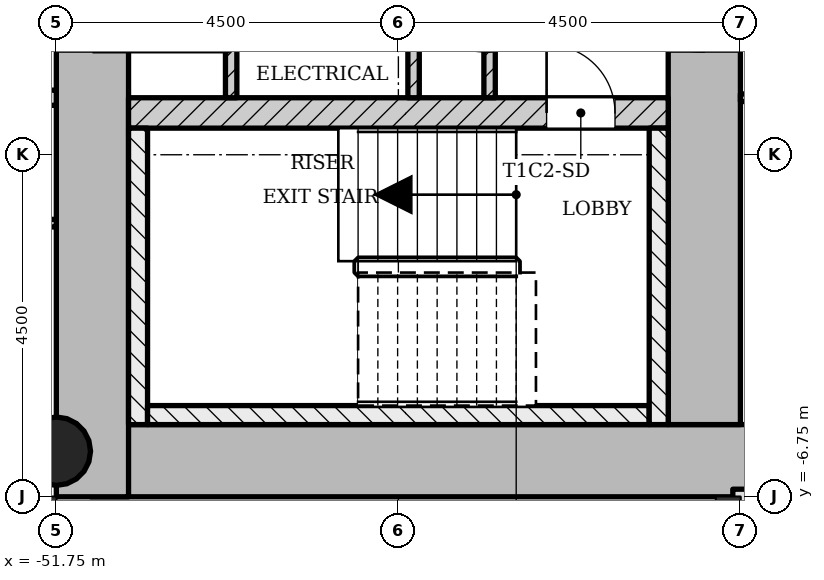
"""IFC4 building model, lengths in metres.
Left out: names, types, materials, properties, quantities, classifications, styles, units other than length and angle.
Written with IfcOpenShell. Run it as: python <this file> out.ifc"""

import sys

from ifc_helpers import new_model, si_unit, direction, frame, frame_2d, origin, origin_2d, place, context, subcontext, project, spatial, rectangle, hollow_circle, extrude, element, fill, save


model = new_model("IFC4")
c1 = context("Model", 3, precision=1e-05, world=origin(), true_north=direction((0.0, 1.0)))
c2 = subcontext(c1, "Body", "Model", "MODEL_VIEW")
j1 = project(units=[si_unit("LENGTHUNIT", "METRE"), si_unit("PLANEANGLEUNIT", "RADIAN")], contexts=[c1])
p1 = place(None, origin())
s1 = spatial("IfcSite", under=j1, at=p1, CompositionType="ELEMENT")
p2 = place(p1, origin())
s2 = spatial("IfcBuilding", under=s1, at=p2, CompositionType="ELEMENT")
p3 = place(p2, frame((0.0, 0.0, 76.6)))
s3 = spatial("IfcBuildingStorey", under=s2, at=p3, CompositionType="ELEMENT", Elevation=76.6)
p4 = place(p3, frame((-51.298, -6.275, 0.0), z_axis=(0.0, 0.0, 1.0), x_axis=(1.0, 0.0, 0.0)))
e1 = element("IfcWall", 1, at=p4, inside=s3, PredefinedType="SHEAR", context=c2, shape_type="SweptSolid", body=[
    extrude(rectangle(XDim=8.696, YDim=0.95, at=frame_2d((4.348, 0.0))), origin(), (0.0, 0.0, 1.0), 3.4),
])
p5 = place(p3, frame((-43.225, -5.8, 0.0), z_axis=(0.0, 0.0, 1.0), x_axis=(0.0, 1.0, 0.0)))
e2 = element("IfcWall", 2, at=p5, inside=s3, PredefinedType="SHEAR", context=c2, shape_type="SweptSolid", body=[
    extrude(rectangle(XDim=12.55, YDim=0.95, at=frame_2d((6.275, 0.0))), origin(), (0.0, 0.0, 1.0), 3.4),
])
p6 = place(p5, frame((4.9, 0.0, 0.0)))
e3 = element("IfcOpeningElement", 3, at=p6, cuts=e2, PredefinedType="OPENING", context=c2, shape_type="SweptSolid", body=[
    extrude(rectangle(XDim=1.8, YDim=2.1, at=frame_2d((0.9, 1.05))), frame((0.0, 0.485, 0.0), z_axis=(0.0, -1.0, 0.0), x_axis=(1.0, 0.0, 0.0)), (0.0, 0.0, 1.0), 0.97),
])
p7 = place(p3, frame((-51.275, 5.8, 0.0), z_axis=(0.0, 0.0, 1.0), x_axis=(0.0, -1.0, 0.0)))
e4 = element("IfcWall", 4, at=p7, inside=s3, PredefinedType="SHEAR", context=c2, shape_type="SweptSolid", body=[
    extrude(rectangle(XDim=12.55, YDim=0.95, at=frame_2d((6.275, 0.0))), origin(), (0.0, 0.0, 1.0), 3.4),
])
p8 = place(p7, frame((4.9, 0.0, 0.0)))
e5 = element("IfcOpeningElement", 5, at=p8, cuts=e4, PredefinedType="OPENING", context=c2, shape_type="SweptSolid", body=[
    extrude(rectangle(XDim=1.8, YDim=2.1, at=frame_2d((0.9, 1.05))), frame((0.0, 0.485, 0.0), z_axis=(0.0, -1.0, 0.0), x_axis=(1.0, 0.0, 0.0)), (0.0, 0.0, 1.0), 0.97),
])
p9 = place(p3, frame((-50.8, -1.7, 0.0), z_axis=(0.0, 0.0, 1.0), x_axis=(1.0, 0.0, 0.0)))
e6 = element("IfcWall", 6, at=p9, inside=s3, PredefinedType="SHEAR", context=c2, shape_type="SweptSolid", body=[
    extrude(rectangle(XDim=7.1, YDim=0.4, at=frame_2d((3.55, 0.0))), origin(), (0.0, 0.0, 1.0), 3.4),
])
p10 = place(p9, frame((5.5, 0.0, 0.0)))
e7 = element("IfcOpeningElement", 7, at=p10, cuts=e6, PredefinedType="OPENING", context=c2, shape_type="SweptSolid", body=[
    extrude(rectangle(XDim=0.9, YDim=2.1, at=frame_2d((0.45, 1.05))), frame((0.0, 0.21, 0.0), z_axis=(0.0, -1.0, 0.0), x_axis=(1.0, 0.0, 0.0)), (0.0, 0.0, 1.0), 0.42),
])
p11 = place(p3, frame((-51.75, -6.15, 0.0), z_axis=(0.0, 0.0, 1.0), x_axis=(1.0, 0.0, 0.0)))
e8 = element("IfcColumn", 8, at=p11, inside=s3, PredefinedType="COLUMN", context=c2, shape_type="SweptSolid", body=[
    extrude(hollow_circle(Radius=0.45, WallThickness=0.032, at=origin_2d()), origin(), (0.0, 0.0, 1.0), 3.4),
])
p12 = place(p3, frame((-46.05, 1.5, 0.0), z_axis=(0.0, 0.0, 1.0), x_axis=(0.0, -1.0, 0.0)))
e9 = element("IfcWall", 9, at=p12, inside=s3, PredefinedType="PARTITIONING", context=c2, shape_type="SweptSolid", body=[
    extrude(rectangle(XDim=3.0, YDim=0.15, at=frame_2d((1.5, 0.0))), origin(), (0.0, 0.0, 1.0), 3.0),
])
p13 = place(p12, frame((0.6, 0.0, 0.0)))
e10 = element("IfcOpeningElement", 10, at=p13, cuts=e9, PredefinedType="OPENING", context=c2, shape_type="SweptSolid", body=[
    extrude(rectangle(XDim=1.8, YDim=2.1, at=frame_2d((0.9, 1.05))), frame((0.0, 0.085, 0.0), z_axis=(0.0, -1.0, 0.0), x_axis=(1.0, 0.0, 0.0)), (0.0, 0.0, 1.0), 0.17),
])
for number, where, z_axis, x_axis in (
    (11, (-47.05, -0.3, 0.0), (0.0, 0.0, 1.0), (0.0, -1.0, 0.0)),
    (12, (-49.45, -0.3, 0.0), (0.0, 0.0, 1.0), (0.0, -1.0, 0.0)),
):
    element("IfcWall", number, at=place(p3, frame(where, z_axis=z_axis, x_axis=x_axis)), inside=s3, PredefinedType="PARTITIONING", context=c2, shape_type="SweptSolid", body=[
        extrude(rectangle(XDim=1.2, YDim=0.15, at=frame_2d((0.6, 0.0))), origin(), (0.0, 0.0, 1.0), 3.0),
    ])
p14 = place(p3, frame((-42.85, -6.75, 0.0), z_axis=(0.0, 0.0, 1.0), x_axis=(1.0, 0.0, 0.0)))
e13 = element("IfcWall", 13, at=p14, inside=s3, PredefinedType="SOLIDWALL", context=c2, shape_type="SweptSolid", body=[
    extrude(rectangle(XDim=5.95, YDim=0.2, at=frame_2d((2.975, 0.0))), origin(), (0.0, 0.0, 1.0), 3.0),
])
p15 = place(p3, frame((-56.25, -3.15, 0.0), z_axis=(0.0, 0.0, 1.0), x_axis=(1.0, 0.0, 0.0)))
e14 = element("IfcWall", 14, at=p15, inside=s3, PredefinedType="PARTITIONING", context=c2, shape_type="SweptSolid", body=[
    extrude(rectangle(XDim=4.5, YDim=0.1, at=frame_2d((2.25, 0.0))), origin(), (0.0, 0.0, 1.0), 3.0),
])
p16 = place(p15, frame((0.6, 0.0, 0.0)))
e15 = element("IfcOpeningElement", 15, at=p16, cuts=e14, PredefinedType="OPENING", context=c2, shape_type="SweptSolid", body=[
    extrude(rectangle(XDim=0.9, YDim=2.1, at=frame_2d((0.45, 1.05))), frame((0.0, 0.06, 0.0), z_axis=(0.0, -1.0, 0.0), x_axis=(1.0, 0.0, 0.0)), (0.0, 0.0, 1.0), 0.12),
])
p17 = place(p3, frame((-42.75, -1.5, 0.0), z_axis=(0.0, 0.0, 1.0), x_axis=(1.0, 0.0, 0.0)))
e16 = element("IfcWall", 16, at=p17, inside=s3, PredefinedType="PARTITIONING", context=c2, shape_type="SweptSolid", body=[
    extrude(rectangle(XDim=5.85, YDim=0.1, at=frame_2d((2.925, 0.0))), origin(), (0.0, 0.0, 1.0), 3.0),
])
p18 = place(p17, frame((0.975, 0.0, 0.0)))
e17 = element("IfcOpeningElement", 17, at=p18, cuts=e16, PredefinedType="OPENING", context=c2, shape_type="SweptSolid", body=[
    extrude(rectangle(XDim=0.9, YDim=2.1, at=frame_2d((0.45, 1.05))), frame((0.0, 0.06, 0.0), z_axis=(0.0, -1.0, 0.0), x_axis=(1.0, 0.0, 0.0)), (0.0, 0.0, 1.0), 0.12),
])
p19 = place(p3, frame((-56.25, -1.5, 0.0), z_axis=(0.0, 0.0, 1.0), x_axis=(1.0, 0.0, 0.0)))
e18 = element("IfcWall", 18, at=p19, inside=s3, PredefinedType="SOLIDWALL", context=c2, shape_type="SweptSolid", body=[
    extrude(rectangle(XDim=4.5, YDim=0.2, at=frame_2d((2.25, 0.0))), origin(), (0.0, 0.0, 1.0), 3.0),
])
p20 = place(p19, frame((0.6, 0.0, 0.0)))
e19 = element("IfcOpeningElement", 19, at=p20, cuts=e18, PredefinedType="OPENING", context=c2, shape_type="SweptSolid", body=[
    extrude(rectangle(XDim=0.9, YDim=2.1, at=frame_2d((0.45, 1.05))), frame((0.0, 0.11, 0.0), z_axis=(0.0, -1.0, 0.0), x_axis=(1.0, 0.0, 0.0)), (0.0, 0.0, 1.0), 0.22),
])
p21 = place(p3, frame((-50.675, -1.9, 0.0), z_axis=(0.0, 0.0, 1.0), x_axis=(0.0, -1.0, 0.0)))
e20 = element("IfcWall", 20, at=p21, inside=s3, PredefinedType="SHEAR", context=c2, shape_type="SweptSolid", body=[
    extrude(rectangle(XDim=3.9, YDim=0.25, at=frame_2d((1.95, 0.0))), origin(), (0.0, 0.0, 1.0), 3.4),
])
p22 = place(p3, frame((-43.95, -5.675, 0.0), z_axis=(0.0, 0.0, 1.0), x_axis=(-1.0, 0.0, 0.0)))
e21 = element("IfcWall", 21, at=p22, inside=s3, PredefinedType="SHEAR", context=c2, shape_type="SweptSolid", body=[
    extrude(rectangle(XDim=6.6, YDim=0.25, at=frame_2d((3.3, 0.0))), origin(), (0.0, 0.0, 1.0), 3.4),
])
p23 = place(p3, frame((-43.825, -1.9, 0.0), z_axis=(0.0, 0.0, 1.0), x_axis=(0.0, -1.0, 0.0)))
e22 = element("IfcWall", 22, at=p23, inside=s3, PredefinedType="SHEAR", context=c2, shape_type="SweptSolid", body=[
    extrude(rectangle(XDim=3.9, YDim=0.25, at=frame_2d((1.95, 0.0))), origin(), (0.0, 0.0, 1.0), 3.4),
])
p24 = place(p13, origin())
e23 = element("IfcDoor", 23, at=p24, inside=s3, OperationType="SINGLE_SWING_LEFT", PredefinedType="DOOR", context=c2, shape_type="SweptSolid", body=[
    extrude(rectangle(XDim=1.8, YDim=2.1, at=frame_2d((0.9, 1.05))), frame((0.0, 0.025, 0.0), z_axis=(0.0, -1.0, 0.0), x_axis=(1.0, 0.0, 0.0)), (0.0, 0.0, 1.0), 0.05),
])
fill(e10, e23)
p25 = place(p10, origin())
e24 = element("IfcDoor", 24, at=p25, inside=s3, OperationType="SINGLE_SWING_RIGHT", PredefinedType="DOOR", context=c2, shape_type="SweptSolid", body=[
    extrude(rectangle(XDim=0.9, YDim=2.1, at=frame_2d((0.45, 1.05))), frame((0.0, 0.025, 0.0), z_axis=(0.0, -1.0, 0.0), x_axis=(1.0, 0.0, 0.0)), (0.0, 0.0, 1.0), 0.05),
])
fill(e7, e24)
p26 = place(p6, origin())
e25 = element("IfcDoor", 25, at=p26, inside=s3, OperationType="SINGLE_SWING_LEFT", PredefinedType="DOOR", context=c2, shape_type="SweptSolid", body=[
    extrude(rectangle(XDim=1.8, YDim=2.1, at=frame_2d((0.9, 1.05))), frame((0.0, 0.025, 0.0), z_axis=(0.0, -1.0, 0.0), x_axis=(1.0, 0.0, 0.0)), (0.0, 0.0, 1.0), 0.05),
])
fill(e3, e25)
save(model, sys.argv[1])
